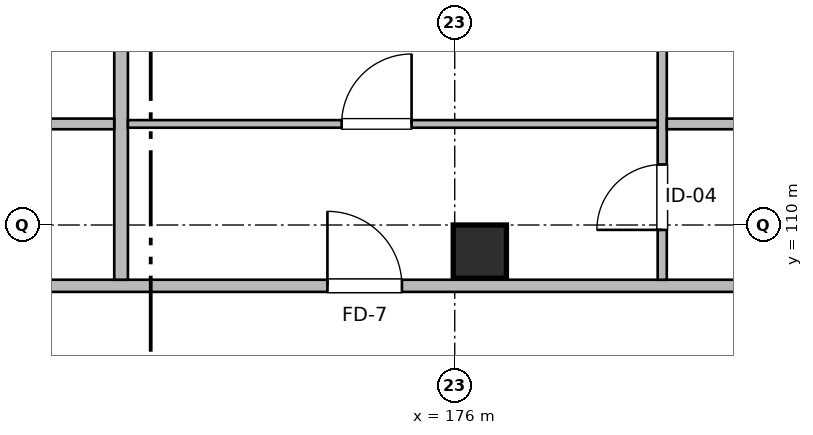
"""IFC4 building model, lengths in metres.
Left out: names, types, materials, properties, quantities, classifications, styles, units other than length and angle.
Written with IfcOpenShell. Run it as: python <this file> out.ifc"""

import sys

from ifc_helpers import new_model, si_unit, direction, frame, frame_2d, origin, origin_2d, place, context, subcontext, project, spatial, rectangle, extrude, element, fill, save


model = new_model("IFC4")
c1 = context("Model", 3, precision=1e-05, world=origin(), true_north=direction((0.0, 1.0)))
c2 = subcontext(c1, "Body", "Model", "MODEL_VIEW")
j1 = project(units=[si_unit("LENGTHUNIT", "METRE"), si_unit("PLANEANGLEUNIT", "RADIAN")], contexts=[c1])
p1 = place(None, origin())
s1 = spatial("IfcSite", under=j1, at=p1, CompositionType="ELEMENT")
p2 = place(p1, origin())
s2 = spatial("IfcBuilding", under=s1, at=p2, CompositionType="ELEMENT")
p3 = place(p2, frame((0.0, 0.0, 7.36)))
s3 = spatial("IfcBuildingStorey", under=s2, at=p3, CompositionType="ELEMENT", Elevation=7.36)
p4 = place(p3, frame((176.33, 109.65, 0.0), z_axis=(0.0, 0.0, 1.0), x_axis=(1.0, 0.0, 0.0)))
e1 = element("IfcColumn", 1, at=p4, inside=s3, PredefinedType="COLUMN", context=c2, shape_type="SweptSolid", body=[
    extrude(rectangle(XDim=0.7, YDim=0.7, at=origin_2d()), origin(), (0.0, 0.0, 1.0), 3.2),
])
p5 = place(p3, frame((147.18, 109.2, 0.0), z_axis=(0.0, 0.0, 1.0), x_axis=(1.0, 0.0, 0.0)))
e2 = element("IfcWall", 2, at=p5, inside=s3, PredefinedType="PARTITIONING", context=c2, shape_type="SweptSolid", body=[
    extrude(rectangle(XDim=36.64, YDim=0.16, at=frame_2d((18.32, 0.0))), origin(), (0.0, 0.0, 1.0), 2.935),
])
p6 = place(p5, frame((3.025, 0.0, 0.0)))
e3 = element("IfcOpeningElement", 3, at=p6, cuts=e2, PredefinedType="OPENING", context=c2, shape_type="SweptSolid", body=[
    extrude(rectangle(XDim=0.98, YDim=2.15, at=frame_2d((0.49, 1.075))), frame((0.0, 0.09, 0.0), z_axis=(0.0, -1.0, 0.0), x_axis=(1.0, 0.0, 0.0)), (0.0, 0.0, 1.0), 0.18),
])
p7 = place(p5, frame((15.7, 0.0, 0.0)))
e4 = element("IfcOpeningElement", 4, at=p7, cuts=e2, PredefinedType="OPENING", context=c2, shape_type="SweptSolid", body=[
    extrude(rectangle(XDim=0.98, YDim=2.15, at=frame_2d((0.49, 1.075))), frame((0.0, 0.09, 0.0), z_axis=(0.0, -1.0, 0.0), x_axis=(1.0, 0.0, 0.0)), (0.0, 0.0, 1.0), 0.18),
])
p8 = place(p5, frame((27.145, 0.0, 0.0)))
e5 = element("IfcOpeningElement", 5, at=p8, cuts=e2, PredefinedType="OPENING", context=c2, shape_type="SweptSolid", body=[
    extrude(rectangle(XDim=0.98, YDim=2.15, at=frame_2d((0.49, 1.075))), frame((0.0, 0.09, 0.0), z_axis=(0.0, -1.0, 0.0), x_axis=(1.0, 0.0, 0.0)), (0.0, 0.0, 1.0), 0.18),
])
p9 = place(p3, frame((171.61, 109.28, 0.0), z_axis=(0.0, 0.0, 1.0), x_axis=(0.0, 1.0, 0.0)))
e6 = element("IfcWall", 6, at=p9, inside=s3, PredefinedType="PARTITIONING", context=c2, shape_type="SweptSolid", body=[
    extrude(rectangle(XDim=6.6, YDim=0.18, at=frame_2d((3.3, 0.0))), origin(), (0.0, 0.0, 1.0), 2.935),
])
p10 = place(p3, frame((166.52, 111.33, 0.0), z_axis=(0.0, 0.0, 1.0), x_axis=(1.0, 0.0, 0.0)))
e7 = element("IfcWall", 7, at=p10, inside=s3, PredefinedType="PARTITIONING", context=c2, shape_type="SweptSolid", body=[
    extrude(rectangle(XDim=5.0, YDim=0.14, at=frame_2d((2.5, 0.0))), origin(), (0.0, 0.0, 1.0), 2.935),
])
p11 = place(p10, frame((0.824, 0.0, 0.0)))
e8 = element("IfcOpeningElement", 8, at=p11, cuts=e7, PredefinedType="OPENING", context=c2, shape_type="SweptSolid", body=[
    extrude(rectangle(XDim=0.85, YDim=2.05, at=frame_2d((0.425, 1.025))), frame((0.0, 0.08, 0.0), z_axis=(0.0, -1.0, 0.0), x_axis=(1.0, 0.0, 0.0)), (0.0, 0.0, 1.0), 0.16),
])
p12 = place(p3, frame((178.73, 109.28, 0.0), z_axis=(0.0, 0.0, 1.0), x_axis=(0.0, 1.0, 0.0)))
e9 = element("IfcWall", 9, at=p12, inside=s3, PredefinedType="PARTITIONING", context=c2, shape_type="SweptSolid", body=[
    extrude(rectangle(XDim=6.6, YDim=0.12, at=frame_2d((3.3, 0.0))), origin(), (0.0, 0.0, 1.0), 2.935),
])
p13 = place(p12, frame((0.656, 0.0, 0.0)))
e10 = element("IfcOpeningElement", 10, at=p13, cuts=e9, PredefinedType="OPENING", context=c2, shape_type="SweptSolid", body=[
    extrude(rectangle(XDim=0.86, YDim=2.1, at=frame_2d((0.43, 1.05))), frame((0.0, 0.07, 0.0), z_axis=(0.0, -1.0, 0.0), x_axis=(1.0, 0.0, 0.0)), (0.0, 0.0, 1.0), 0.14),
])
p14 = place(p12, frame((4.097, 0.0, 0.0)))
e11 = element("IfcOpeningElement", 11, at=p14, cuts=e9, PredefinedType="OPENING", context=c2, shape_type="SweptSolid", body=[
    extrude(rectangle(XDim=0.9, YDim=2.1, at=frame_2d((0.45, 1.05))), frame((0.0, 0.07, 0.0), z_axis=(0.0, -1.0, 0.0), x_axis=(1.0, 0.0, 0.0)), (0.0, 0.0, 1.0), 0.14),
])
p15 = place(p3, frame((178.79, 111.33, 0.0), z_axis=(0.0, 0.0, 1.0), x_axis=(1.0, 0.0, 0.0)))
e12 = element("IfcWall", 12, at=p15, inside=s3, PredefinedType="PARTITIONING", context=c2, shape_type="SweptSolid", body=[
    extrude(rectangle(XDim=5.03, YDim=0.14, at=frame_2d((2.515, 0.0))), origin(), (0.0, 0.0, 1.0), 2.935),
])
p16 = place(p15, frame((2.036, 0.0, 0.0)))
e13 = element("IfcOpeningElement", 13, at=p16, cuts=e12, PredefinedType="OPENING", context=c2, shape_type="SweptSolid", body=[
    extrude(rectangle(XDim=0.85, YDim=2.05, at=frame_2d((0.425, 1.025))), frame((0.0, 0.08, 0.0), z_axis=(0.0, -1.0, 0.0), x_axis=(1.0, 0.0, 0.0)), (0.0, 0.0, 1.0), 0.16),
])
p17 = place(p3, frame((171.7, 111.33, 0.0), z_axis=(0.0, 0.0, 1.0), x_axis=(1.0, 0.0, 0.0)))
e14 = element("IfcWall", 14, at=p17, inside=s3, PredefinedType="PARTITIONING", context=c2, shape_type="SweptSolid", body=[
    extrude(rectangle(XDim=6.97, YDim=0.1, at=frame_2d((3.485, 0.0))), origin(), (0.0, 0.0, 1.0), 2.935),
])
p18 = place(p17, frame((2.812, 0.0, 0.0)))
e15 = element("IfcOpeningElement", 15, at=p18, cuts=e14, PredefinedType="OPENING", context=c2, shape_type="SweptSolid", body=[
    extrude(rectangle(XDim=0.92, YDim=2.1, at=frame_2d((0.46, 1.05))), frame((0.0, 0.06, 0.0), z_axis=(0.0, -1.0, 0.0), x_axis=(1.0, 0.0, 0.0)), (0.0, 0.0, 1.0), 0.12),
])
p19 = place(p8, origin())
e16 = element("IfcDoor", 16, at=p19, inside=s3, OperationType="SINGLE_SWING_LEFT", PredefinedType="DOOR", context=c2, shape_type="SweptSolid", body=[
    extrude(rectangle(XDim=0.98, YDim=2.15, at=frame_2d((0.49, 1.075))), frame((0.0, 0.025, 0.0), z_axis=(0.0, -1.0, 0.0), x_axis=(1.0, 0.0, 0.0)), (0.0, 0.0, 1.0), 0.05),
])
fill(e5, e16)
p20 = place(p18, origin())
e17 = element("IfcDoor", 17, at=p20, inside=s3, OperationType="SINGLE_SWING_RIGHT", PredefinedType="DOOR", context=c2, shape_type="SweptSolid", body=[
    extrude(rectangle(XDim=0.92, YDim=2.1, at=frame_2d((0.46, 1.05))), frame((0.0, 0.025, 0.0), z_axis=(0.0, -1.0, 0.0), x_axis=(1.0, 0.0, 0.0)), (0.0, 0.0, 1.0), 0.05),
])
fill(e15, e17)
p21 = place(p13, origin())
e18 = element("IfcDoor", 18, at=p21, inside=s3, OperationType="SINGLE_SWING_LEFT", PredefinedType="DOOR", context=c2, shape_type="SweptSolid", body=[
    extrude(rectangle(XDim=0.86, YDim=2.1, at=frame_2d((0.43, 1.05))), frame((0.0, 0.025, 0.0), z_axis=(0.0, -1.0, 0.0), x_axis=(1.0, 0.0, 0.0)), (0.0, 0.0, 1.0), 0.05),
])
fill(e10, e18)
save(model, sys.argv[1])
